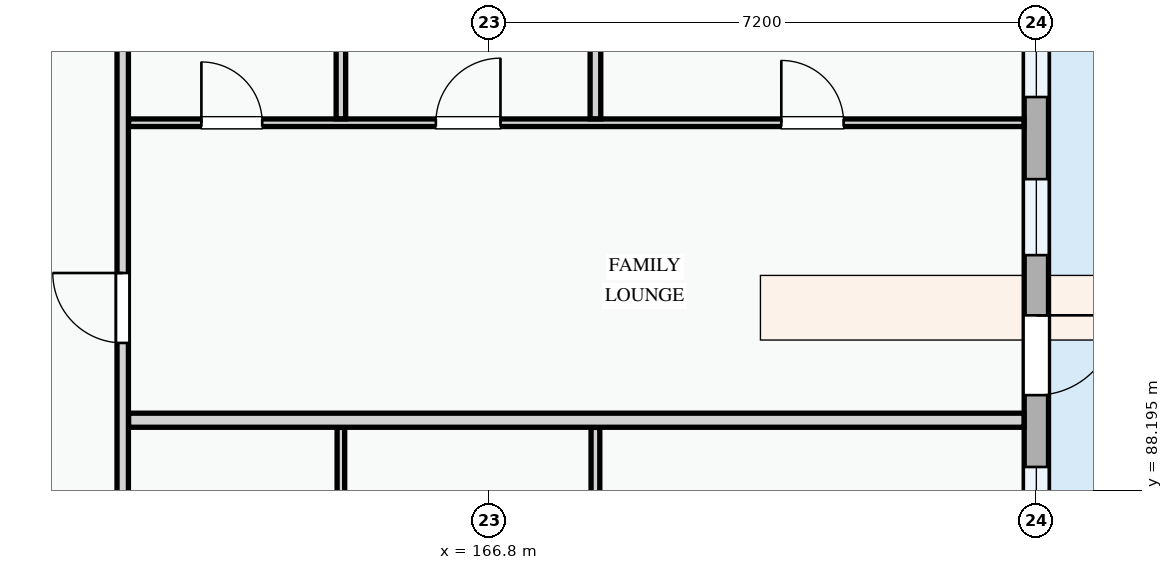
"""IFC4 building model, lengths in metres.
Left out: names, types, materials, properties, quantities, classifications, styles, units other than length and angle.
Written with IfcOpenShell. Run it as: python <this file> out.ifc"""

import sys

from ifc_helpers import new_model, si_unit, direction, frame, frame_2d, origin, place, context, subcontext, project, spatial, rectangle, extrude, element, fill, save


model = new_model("IFC4")
c1 = context("Model", 3, precision=1e-05, world=origin(), true_north=direction((0.0, 1.0)))
c2 = subcontext(c1, "Body", "Model", "MODEL_VIEW")
j1 = project(units=[si_unit("LENGTHUNIT", "METRE"), si_unit("PLANEANGLEUNIT", "RADIAN")], contexts=[c1])
p1 = place(None, origin())
s1 = spatial("IfcSite", under=j1, at=p1, CompositionType="ELEMENT")
p2 = place(p1, origin())
s2 = spatial("IfcBuilding", under=s1, at=p2, CompositionType="ELEMENT")
p3 = place(p2, frame((0.0, 0.0, 18.0)))
s3 = spatial("IfcBuildingStorey", under=s2, at=p3, CompositionType="ELEMENT", Elevation=18.0)
p4 = place(p3, frame((174.0, 86.4, 0.0), z_axis=(0.0, 0.0, 1.0), x_axis=(0.0, 1.0, 0.0)))
e1 = element("IfcWall", 1, at=p4, inside=s3, PredefinedType="STANDARD", context=c2, shape_type="SweptSolid", body=[
    extrude(rectangle(XDim=8.4, YDim=0.32, at=frame_2d((4.2, 0.0))), origin(), (0.0, 0.0, 1.0), 2.425),
])
p5 = place(p4, frame((3.05, 0.0, 0.0)))
e2 = element("IfcOpeningElement", 2, at=p5, cuts=e1, PredefinedType="OPENING", context=c2, shape_type="SweptSolid", body=[
    extrude(rectangle(XDim=1.05, YDim=2.15, at=frame_2d((0.525, 1.075))), frame((0.0, 0.17, 0.0), z_axis=(0.0, -1.0, 0.0), x_axis=(1.0, 0.0, 0.0)), (0.0, 0.0, 1.0), 0.34),
])
p6 = place(p4, frame((0.805, 0.0, 0.78)))
e3 = element("IfcOpeningElement", 3, at=p6, cuts=e1, PredefinedType="OPENING", context=c2, shape_type="SweptSolid", body=[
    extrude(rectangle(XDim=1.3, YDim=1.4, at=frame_2d((0.65, 0.7))), frame((0.0, 0.17, 0.0), z_axis=(0.0, -1.0, 0.0), x_axis=(1.0, 0.0, 0.0)), (0.0, 0.0, 1.0), 0.34),
])
p7 = place(p4, frame((4.892, 0.0, 0.78)))
e4 = element("IfcOpeningElement", 4, at=p7, cuts=e1, PredefinedType="OPENING", context=c2, shape_type="SweptSolid", body=[
    extrude(rectangle(XDim=1.0, YDim=1.25, at=frame_2d((0.5, 0.625))), frame((0.0, 0.17, 0.0), z_axis=(0.0, -1.0, 0.0), x_axis=(1.0, 0.0, 0.0)), (0.0, 0.0, 1.0), 0.34),
])
p8 = place(p4, frame((6.972, 0.0, 0.78)))
e5 = element("IfcOpeningElement", 5, at=p8, cuts=e1, PredefinedType="OPENING", context=c2, shape_type="SweptSolid", body=[
    extrude(rectangle(XDim=0.9, YDim=1.2, at=frame_2d((0.45, 0.6))), frame((0.0, 0.17, 0.0), z_axis=(0.0, -1.0, 0.0), x_axis=(1.0, 0.0, 0.0)), (0.0, 0.0, 1.0), 0.34),
])
p9 = place(p3, frame((168.199, 84.681, 0.0), z_axis=(0.0, 0.0, 1.0), x_axis=(0.0, 1.0, 0.0)))
e6 = element("IfcWall", 6, at=p9, inside=s3, PredefinedType="PARTITIONING", context=c2, shape_type="SweptSolid", body=[
    extrude(rectangle(XDim=4.344, YDim=0.115, at=frame_2d((2.172, 0.0))), origin(), (0.0, 0.0, 1.0), 3.0),
])
p10 = place(p3, frame((164.85, 84.681, 0.0), z_axis=(0.0, 0.0, 1.0), x_axis=(0.0, 1.0, 0.0)))
e7 = element("IfcWall", 7, at=p10, inside=s3, PredefinedType="PARTITIONING", context=c2, shape_type="SweptSolid", body=[
    extrude(rectangle(XDim=4.344, YDim=0.1, at=frame_2d((2.172, 0.0))), origin(), (0.0, 0.0, 1.0), 3.0),
])
p11 = place(p3, frame((162.057, 93.034, 0.0), z_axis=(0.0, 0.0, 1.0), x_axis=(1.0, 0.0, 0.0)))
e8 = element("IfcWall", 8, at=p11, inside=s3, PredefinedType="PARTITIONING", context=c2, shape_type="SweptSolid", body=[
    extrude(rectangle(XDim=11.781, YDim=0.1, at=frame_2d((5.891, 0.0))), origin(), (0.0, 0.0, 1.0), 3.0),
])
p12 = place(p11, frame((0.958, 0.0, 0.0)))
e9 = element("IfcOpeningElement", 9, at=p12, cuts=e8, PredefinedType="OPENING", context=c2, shape_type="SweptSolid", body=[
    extrude(rectangle(XDim=0.8, YDim=2.1, at=frame_2d((0.4, 1.05))), frame((0.0, 0.06, 0.0), z_axis=(0.0, -1.0, 0.0), x_axis=(1.0, 0.0, 0.0)), (0.0, 0.0, 1.0), 0.12),
])
p13 = place(p11, frame((4.043, 0.0, 0.0)))
e10 = element("IfcOpeningElement", 10, at=p13, cuts=e8, PredefinedType="OPENING", context=c2, shape_type="SweptSolid", body=[
    extrude(rectangle(XDim=0.85, YDim=2.1, at=frame_2d((0.425, 1.05))), frame((0.0, 0.06, 0.0), z_axis=(0.0, -1.0, 0.0), x_axis=(1.0, 0.0, 0.0)), (0.0, 0.0, 1.0), 0.12),
])
p14 = place(p11, frame((8.588, 0.0, 0.0)))
e11 = element("IfcOpeningElement", 11, at=p14, cuts=e8, PredefinedType="OPENING", context=c2, shape_type="SweptSolid", body=[
    extrude(rectangle(XDim=0.82, YDim=2.08, at=frame_2d((0.41, 1.04))), frame((0.0, 0.06, 0.0), z_axis=(0.0, -1.0, 0.0), x_axis=(1.0, 0.0, 0.0)), (0.0, 0.0, 1.0), 0.12),
])
p15 = place(p3, frame((168.199, 93.086, 0.0), z_axis=(0.0, 0.0, 1.0), x_axis=(0.0, 1.0, 0.0)))
e12 = element("IfcWall", 12, at=p15, inside=s3, PredefinedType="PARTITIONING", context=c2, shape_type="SweptSolid", body=[
    extrude(rectangle(XDim=5.742, YDim=0.14, at=frame_2d((2.871, 0.0))), origin(), (0.0, 0.0, 1.0), 3.0),
])
p16 = place(p3, frame((164.85, 93.086, 0.0), z_axis=(0.0, 0.0, 1.0), x_axis=(0.0, 1.0, 0.0)))
e13 = element("IfcWall", 13, at=p16, inside=s3, PredefinedType="PARTITIONING", context=c2, shape_type="SweptSolid", body=[
    extrude(rectangle(XDim=5.742, YDim=0.125, at=frame_2d((2.871, 0.0))), origin(), (0.0, 0.0, 1.0), 3.0),
])
p17 = place(p3, frame((162.057, 89.12, 0.0), z_axis=(0.0, 0.0, 1.0), x_axis=(1.0, 0.0, 0.0)))
e14 = element("IfcWall", 14, at=p17, inside=s3, PredefinedType="PARTITIONING", context=c2, shape_type="SweptSolid", body=[
    extrude(rectangle(XDim=11.781, YDim=0.185, at=frame_2d((5.891, 0.0))), origin(), (0.0, 0.0, 1.0), 3.0),
])
p18 = place(p3, frame((161.98, 80.46, 0.0), z_axis=(0.0, 0.0, 1.0), x_axis=(0.0, 1.0, 0.0)))
e15 = element("IfcWall", 15, at=p18, inside=s3, PredefinedType="PARTITIONING", context=c2, shape_type="SweptSolid", body=[
    extrude(rectangle(XDim=28.88, YDim=0.15, at=frame_2d((14.44, 0.0))), origin(), (0.0, 0.0, 1.0), 3.0),
])
p19 = place(p18, frame((2.441, 0.0, 0.0)))
e16 = element("IfcOpeningElement", 16, at=p19, cuts=e15, PredefinedType="OPENING", context=c2, shape_type="SweptSolid", body=[
    extrude(rectangle(XDim=0.92, YDim=2.1, at=frame_2d((0.46, 1.05))), frame((0.0, 0.085, 0.0), z_axis=(0.0, -1.0, 0.0), x_axis=(1.0, 0.0, 0.0)), (0.0, 0.0, 1.0), 0.17),
])
p20 = place(p18, frame((9.677, 0.0, 0.0)))
e17 = element("IfcOpeningElement", 17, at=p20, cuts=e15, PredefinedType="OPENING", context=c2, shape_type="SweptSolid", body=[
    extrude(rectangle(XDim=0.92, YDim=2.1, at=frame_2d((0.46, 1.05))), frame((0.0, 0.085, 0.0), z_axis=(0.0, -1.0, 0.0), x_axis=(1.0, 0.0, 0.0)), (0.0, 0.0, 1.0), 0.17),
])
p21 = place(p18, frame((22.262, 0.0, 0.0)))
e18 = element("IfcOpeningElement", 18, at=p21, cuts=e15, PredefinedType="OPENING", context=c2, shape_type="SweptSolid", body=[
    extrude(rectangle(XDim=0.96, YDim=2.12, at=frame_2d((0.48, 1.06))), frame((0.0, 0.085, 0.0), z_axis=(0.0, -1.0, 0.0), x_axis=(1.0, 0.0, 0.0)), (0.0, 0.0, 1.0), 0.17),
])
p22 = place(p5, frame((1.05, 0.0, 0.0), z_axis=(0.0, 0.0, 1.0), x_axis=(-1.0, 0.0, 0.0)))
e19 = element("IfcDoor", 19, at=p22, inside=s3, OperationType="SINGLE_SWING_LEFT", PredefinedType="DOOR", context=c2, shape_type="SweptSolid", body=[
    extrude(rectangle(XDim=1.05, YDim=2.15, at=frame_2d((0.525, 1.075))), frame((0.0, 0.025, 0.0), z_axis=(0.0, -1.0, 0.0), x_axis=(1.0, 0.0, 0.0)), (0.0, 0.0, 1.0), 0.05),
])
fill(e2, e19)
p23 = place(p6, origin())
e20 = element("IfcWindow", 20, at=p23, inside=s3, PartitioningType="SINGLE_PANEL", PredefinedType="WINDOW", context=c2, shape_type="SweptSolid", body=[
    extrude(rectangle(XDim=1.3, YDim=1.4, at=frame_2d((0.65, 0.7))), frame((0.0, 0.03, 0.0), z_axis=(0.0, -1.0, 0.0), x_axis=(1.0, 0.0, 0.0)), (0.0, 0.0, 1.0), 0.06),
])
fill(e3, e20)
p24 = place(p7, origin())
e21 = element("IfcWindow", 21, at=p24, inside=s3, PartitioningType="SINGLE_PANEL", PredefinedType="WINDOW", context=c2, shape_type="SweptSolid", body=[
    extrude(rectangle(XDim=1.0, YDim=1.25, at=frame_2d((0.5, 0.625))), frame((0.0, 0.03, 0.0), z_axis=(0.0, -1.0, 0.0), x_axis=(1.0, 0.0, 0.0)), (0.0, 0.0, 1.0), 0.06),
])
fill(e4, e21)
p25 = place(p8, origin())
e22 = element("IfcWindow", 22, at=p25, inside=s3, PartitioningType="SINGLE_PANEL", PredefinedType="WINDOW", context=c2, shape_type="SweptSolid", body=[
    extrude(rectangle(XDim=0.9, YDim=1.2, at=frame_2d((0.45, 0.6))), frame((0.0, 0.03, 0.0), z_axis=(0.0, -1.0, 0.0), x_axis=(1.0, 0.0, 0.0)), (0.0, 0.0, 1.0), 0.06),
])
fill(e5, e22)
p26 = place(p12, origin())
e23 = element("IfcDoor", 23, at=p26, inside=s3, OperationType="SINGLE_SWING_LEFT", PredefinedType="DOOR", context=c2, shape_type="SweptSolid", body=[
    extrude(rectangle(XDim=0.8, YDim=2.1, at=frame_2d((0.4, 1.05))), frame((0.0, 0.025, 0.0), z_axis=(0.0, -1.0, 0.0), x_axis=(1.0, 0.0, 0.0)), (0.0, 0.0, 1.0), 0.05),
])
fill(e9, e23)
p27 = place(p13, origin())
e24 = element("IfcDoor", 24, at=p27, inside=s3, OperationType="SINGLE_SWING_RIGHT", PredefinedType="DOOR", context=c2, shape_type="SweptSolid", body=[
    extrude(rectangle(XDim=0.85, YDim=2.1, at=frame_2d((0.425, 1.05))), frame((0.0, 0.025, 0.0), z_axis=(0.0, -1.0, 0.0), x_axis=(1.0, 0.0, 0.0)), (0.0, 0.0, 1.0), 0.05),
])
fill(e10, e24)
p28 = place(p14, origin())
e25 = element("IfcDoor", 25, at=p28, inside=s3, OperationType="SINGLE_SWING_LEFT", PredefinedType="DOOR", context=c2, shape_type="SweptSolid", body=[
    extrude(rectangle(XDim=0.82, YDim=2.08, at=frame_2d((0.41, 1.04))), frame((0.0, 0.025, 0.0), z_axis=(0.0, -1.0, 0.0), x_axis=(1.0, 0.0, 0.0)), (0.0, 0.0, 1.0), 0.05),
])
fill(e11, e25)
p29 = place(p20, origin())
e26 = element("IfcDoor", 26, at=p29, inside=s3, OperationType="SINGLE_SWING_RIGHT", PredefinedType="DOOR", context=c2, shape_type="SweptSolid", body=[
    extrude(rectangle(XDim=0.92, YDim=2.1, at=frame_2d((0.46, 1.05))), frame((0.0, 0.025, 0.0), z_axis=(0.0, -1.0, 0.0), x_axis=(1.0, 0.0, 0.0)), (0.0, 0.0, 1.0), 0.05),
])
fill(e17, e26)
save(model, sys.argv[1])
